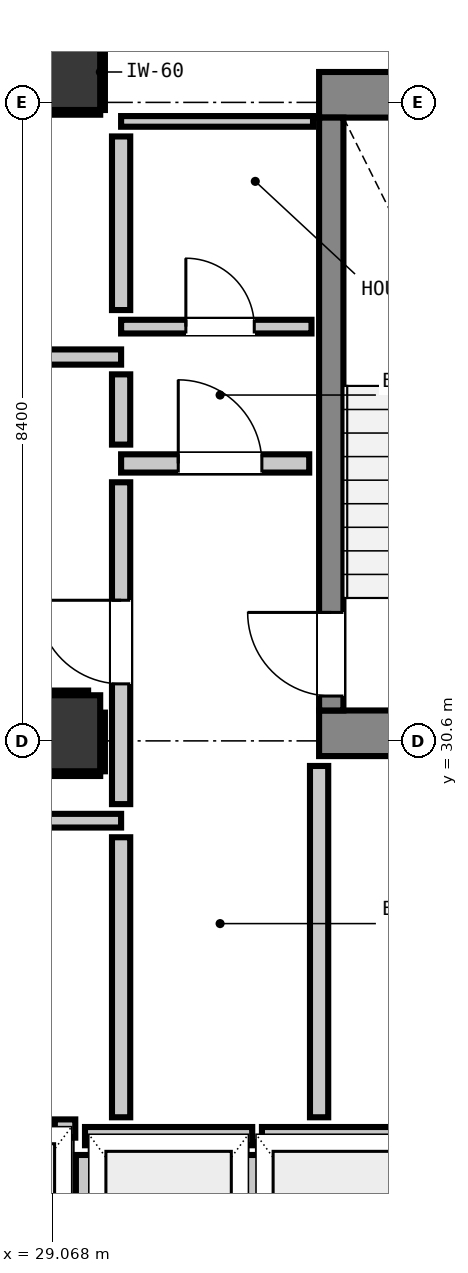
"""IFC4 building model, lengths in metres.
Left out: names, types, materials, properties, quantities, classifications, styles, units other than length and angle.
Written with IfcOpenShell. Run it as: python <this file> out.ifc"""

import sys

from ifc_helpers import new_model, si_unit, direction, frame, frame_2d, origin, origin_2d, place, context, subcontext, project, spatial, rectangle, extrude, element, fill, save


model = new_model("IFC4")
c1 = context("Model", 3, precision=1e-05, world=origin(), true_north=direction((0.0, 1.0)))
c2 = subcontext(c1, "Body", "Model", "MODEL_VIEW")
j1 = project(units=[si_unit("LENGTHUNIT", "METRE"), si_unit("PLANEANGLEUNIT", "RADIAN")], contexts=[c1])
p1 = place(None, origin())
s1 = spatial("IfcSite", under=j1, at=p1, CompositionType="ELEMENT")
p2 = place(p1, origin())
s2 = spatial("IfcBuilding", under=s1, at=p2, CompositionType="ELEMENT")
p3 = place(p2, frame((0.0, 0.0, 61.84)))
s3 = spatial("IfcBuildingStorey", under=s2, at=p3, CompositionType="ELEMENT", Elevation=61.84)
p4 = place(p3, frame((29.2, 39.4, 0.0), z_axis=(0.0, 0.0, 1.0), x_axis=(1.0, 0.0, 0.0)))
e1 = element("IfcColumn", 1, at=p4, inside=s3, PredefinedType="COLUMN", context=c2, shape_type="SweptSolid", body=[
    extrude(rectangle(XDim=1.0, YDim=1.0, at=origin_2d()), origin(), (0.0, 0.0, 1.0), 3.32),
])
p5 = place(p3, frame((32.58, 39.1, 0.0), z_axis=(0.0, 0.0, 1.0), x_axis=(1.0, 0.0, 0.0)))
e2 = element("IfcWall", 2, at=p5, inside=s3, PredefinedType="SHEAR", context=c2, shape_type="SweptSolid", body=[
    extrude(rectangle(XDim=4.08, YDim=0.6, at=frame_2d((2.04, 0.0))), origin(), (0.0, 0.0, 1.0), 3.32),
])
p6 = place(p3, frame((32.58, 30.7, 0.0), z_axis=(0.0, 0.0, 1.0), x_axis=(1.0, 0.0, 0.0)))
e3 = element("IfcWall", 3, at=p6, inside=s3, PredefinedType="SHEAR", context=c2, shape_type="SweptSolid", body=[
    extrude(rectangle(XDim=3.415, YDim=0.6, at=frame_2d((1.708, 0.0))), origin(), (0.0, 0.0, 1.0), 3.32),
])
p7 = place(p3, frame((32.74, 31.0, 0.0), z_axis=(0.0, 0.0, 1.0), x_axis=(0.0, 1.0, 0.0)))
e4 = element("IfcWall", 4, at=p7, inside=s3, PredefinedType="SHEAR", context=c2, shape_type="SweptSolid", body=[
    extrude(rectangle(XDim=7.8, YDim=0.32, at=frame_2d((3.9, 0.0))), origin(), (0.0, 0.0, 1.0), 3.32),
])
p8 = place(p7, frame((0.19, 0.0, 0.0)))
e5 = element("IfcOpeningElement", 5, at=p8, cuts=e4, PredefinedType="OPENING", context=c2, shape_type="SweptSolid", body=[
    extrude(rectangle(XDim=1.1, YDim=2.15, at=frame_2d((0.55, 1.075))), frame((0.0, 0.17, 0.0), z_axis=(0.0, -1.0, 0.0), x_axis=(1.0, 0.0, 0.0)), (0.0, 0.0, 1.0), 0.34),
])
p9 = place(p3, frame((29.2, 30.7, 0.0), z_axis=(0.0, 0.0, 1.0), x_axis=(1.0, 0.0, 0.0)))
e6 = element("IfcColumn", 6, at=p9, inside=s3, PredefinedType="COLUMN", context=c2, shape_type="SweptSolid", body=[
    extrude(rectangle(XDim=1.0, YDim=1.0, at=origin_2d()), origin(), (0.0, 0.0, 1.0), 3.32),
])
p10 = place(p3, frame((29.5, 25.4, 0.0), z_axis=(0.0, 0.0, 1.0), x_axis=(1.0, 0.0, 0.0)))
e7 = element("IfcWall", 7, at=p10, inside=s3, PredefinedType="PARTITIONING", context=c2, shape_type="SweptSolid", body=[
    extrude(rectangle(XDim=2.2, YDim=0.24, at=frame_2d((1.1, 0.0))), origin(), (0.0, 0.0, 1.0), 3.06),
])
p11 = place(p3, frame((29.5, 22.632, 0.0), z_axis=(0.0, 0.0, 1.0), x_axis=(0.0, 1.0, 0.0)))
e8 = element("IfcWall", 8, at=p11, inside=s3, PredefinedType="PARTITIONING", context=c2, shape_type="SweptSolid", body=[
    extrude(rectangle(XDim=2.52, YDim=0.24, at=frame_2d((1.26, 0.0))), origin(), (0.0, 0.0, 1.0), 2.295),
])
p12 = place(p3, frame((31.7, 22.73, 0.0), z_axis=(0.0, 0.0, 1.0), x_axis=(0.0, 1.0, 0.0)))
e9 = element("IfcWall", 9, at=p12, inside=s3, PredefinedType="PARTITIONING", context=c2, shape_type="SweptSolid", body=[
    extrude(rectangle(XDim=2.422, YDim=0.24, at=frame_2d((1.211, 0.0))), origin(), (0.0, 0.0, 1.0), 3.06),
])
p13 = place(p3, frame((31.828, 25.4, 0.0), z_axis=(0.0, 0.0, 1.0), x_axis=(1.0, 0.0, 0.0)))
e10 = element("IfcWall", 10, at=p13, inside=s3, PredefinedType="PARTITIONING", context=c2, shape_type="SweptSolid", body=[
    extrude(rectangle(XDim=2.072, YDim=0.24, at=frame_2d((1.036, 0.0))), origin(), (0.0, 0.0, 1.0), 3.06),
])
p14 = place(p3, frame((29.103, 25.5, 0.0), z_axis=(0.0, 0.0, 1.0), x_axis=(1.0, 0.0, 0.0)))
e11 = element("IfcWall", 11, at=p14, inside=s3, PredefinedType="PARTITIONING", context=c2, shape_type="SweptSolid", body=[
    extrude(rectangle(XDim=0.269, YDim=0.24, at=frame_2d((0.135, 0.0))), origin(), (0.0, 0.0, 1.0), 3.06),
])
p15 = place(p3, frame((29.975, 34.25, 0.0), z_axis=(0.0, 0.0, 1.0), x_axis=(1.0, 0.0, 0.0)))
e12 = element("IfcWall", 12, at=p15, inside=s3, PredefinedType="PARTITIONING", context=c2, shape_type="SweptSolid", body=[
    extrude(rectangle(XDim=2.475, YDim=0.24, at=frame_2d((1.237, 0.0))), origin(), (0.0, 0.0, 1.0), 3.06),
])
p16 = place(p15, frame((0.752, 0.0, 0.0)))
e13 = element("IfcOpeningElement", 13, at=p16, cuts=e12, PredefinedType="OPENING", context=c2, shape_type="SweptSolid", body=[
    extrude(rectangle(XDim=1.1, YDim=2.15, at=frame_2d((0.55, 1.075))), frame((0.0, 0.13, 0.0), z_axis=(0.0, -1.0, 0.0), x_axis=(1.0, 0.0, 0.0)), (0.0, 0.0, 1.0), 0.26),
])
p17 = place(p3, frame((28.604, 35.65, 0.0), z_axis=(0.0, 0.0, 1.0), x_axis=(1.0, 0.0, 0.0)))
e14 = element("IfcWall", 14, at=p17, inside=s3, PredefinedType="PARTITIONING", context=c2, shape_type="SweptSolid", body=[
    extrude(rectangle(XDim=1.371, YDim=0.2, at=frame_2d((0.686, 0.0))), origin(), (0.0, 0.0, 1.0), 3.06),
])
p18 = place(p3, frame((20.65, 29.55, 0.0), z_axis=(0.0, 0.0, 1.0), x_axis=(1.0, 0.0, 0.0)))
e15 = element("IfcWall", 15, at=p18, inside=s3, PredefinedType="PARTITIONING", context=c2, shape_type="SweptSolid", body=[
    extrude(rectangle(XDim=9.325, YDim=0.18, at=frame_2d((4.663, 0.0))), origin(), (0.0, 0.0, 1.0), 3.06),
])
p19 = place(p3, frame((29.975, 36.05, 0.0), z_axis=(0.0, 0.0, 1.0), x_axis=(1.0, 0.0, 0.0)))
e16 = element("IfcWall", 16, at=p19, inside=s3, PredefinedType="PARTITIONING", context=c2, shape_type="SweptSolid", body=[
    extrude(rectangle(XDim=2.505, YDim=0.18, at=frame_2d((1.252, 0.0))), origin(), (0.0, 0.0, 1.0), 3.06),
])
p20 = place(p19, frame((0.852, 0.0, 0.0)))
e17 = element("IfcOpeningElement", 17, at=p20, cuts=e16, PredefinedType="OPENING", context=c2, shape_type="SweptSolid", body=[
    extrude(rectangle(XDim=0.9, YDim=2.1, at=frame_2d((0.45, 1.05))), frame((0.0, 0.1, 0.0), z_axis=(0.0, -1.0, 0.0), x_axis=(1.0, 0.0, 0.0)), (0.0, 0.0, 1.0), 0.2),
])
p21 = place(p3, frame((29.975, 38.75, 0.0), z_axis=(0.0, 0.0, 1.0), x_axis=(1.0, 0.0, 0.0)))
e18 = element("IfcWall", 18, at=p21, inside=s3, PredefinedType="PARTITIONING", context=c2, shape_type="SweptSolid", body=[
    extrude(rectangle(XDim=2.525, YDim=0.14, at=frame_2d((1.262, 0.0))), origin(), (0.0, 0.0, 1.0), 3.06),
])
p22 = place(p3, frame((29.975, 25.648, 0.0), z_axis=(0.0, 0.0, 1.0), x_axis=(0.0, 1.0, 0.0)))
e19 = element("IfcWall", 19, at=p22, inside=s3, PredefinedType="PARTITIONING", context=c2, shape_type="SweptSolid", body=[
    extrude(rectangle(XDim=3.684, YDim=0.24, at=frame_2d((1.842, 0.0))), origin(), (0.0, 0.0, 1.0), 3.06),
])
p23 = place(p3, frame((29.975, 29.768, 0.0), z_axis=(0.0, 0.0, 1.0), x_axis=(0.0, 1.0, 0.0)))
e20 = element("IfcWall", 20, at=p23, inside=s3, PredefinedType="PARTITIONING", context=c2, shape_type="SweptSolid", body=[
    extrude(rectangle(XDim=4.234, YDim=0.24, at=frame_2d((2.117, 0.0))), origin(), (0.0, 0.0, 1.0), 3.06),
])
p24 = place(p23, frame((1.582, 0.0, 0.0)))
e21 = element("IfcOpeningElement", 21, at=p24, cuts=e20, PredefinedType="OPENING", context=c2, shape_type="SweptSolid", body=[
    extrude(rectangle(XDim=1.1, YDim=2.15, at=frame_2d((0.55, 1.075))), frame((0.0, 0.13, 0.0), z_axis=(0.0, -1.0, 0.0), x_axis=(1.0, 0.0, 0.0)), (0.0, 0.0, 1.0), 0.26),
])
p25 = place(p3, frame((29.975, 34.498, 0.0), z_axis=(0.0, 0.0, 1.0), x_axis=(0.0, 1.0, 0.0)))
e22 = element("IfcWall", 22, at=p25, inside=s3, PredefinedType="PARTITIONING", context=c2, shape_type="SweptSolid", body=[
    extrude(rectangle(XDim=0.924, YDim=0.24, at=frame_2d((0.462, 0.0))), origin(), (0.0, 0.0, 1.0), 3.06),
])
p26 = place(p3, frame((29.975, 36.268, 0.0), z_axis=(0.0, 0.0, 1.0), x_axis=(0.0, 1.0, 0.0)))
e23 = element("IfcWall", 23, at=p26, inside=s3, PredefinedType="PARTITIONING", context=c2, shape_type="SweptSolid", body=[
    extrude(rectangle(XDim=2.284, YDim=0.24, at=frame_2d((1.142, 0.0))), origin(), (0.0, 0.0, 1.0), 3.06),
])
p27 = place(p3, frame((32.58, 25.648, 0.0), z_axis=(0.0, 0.0, 1.0), x_axis=(0.0, 1.0, 0.0)))
e24 = element("IfcWall", 24, at=p27, inside=s3, PredefinedType="PARTITIONING", context=c2, shape_type="SweptSolid", body=[
    extrude(rectangle(XDim=4.622, YDim=0.24, at=frame_2d((2.311, 0.0))), origin(), (0.0, 0.0, 1.0), 3.06),
])
p28 = place(p3, frame((28.71, 38.868, 0.0), z_axis=(0.0, 0.0, 1.0), x_axis=(1.0, 0.0, 0.0)))
e25 = element("IfcWall", 25, at=p28, inside=s3, PredefinedType="PARTITIONING", context=c2, shape_type="SweptSolid", body=[
    extrude(rectangle(XDim=0.99, YDim=0.06, at=frame_2d((0.495, 0.0))), origin(), (0.0, 0.0, 1.0), 1.45),
])
for number, where, z_axis, x_axis in (
    (26, (29.732, 38.9, 0.0), (0.0, 0.0, 1.0), (0.0, 1.0, 0.0)),
    (27, (28.7, 30.168, 0.0), (0.0, 0.0, 1.0), (1.0, 0.0, 0.0)),
):
    element("IfcWall", number, at=place(p3, frame(where, z_axis=z_axis, x_axis=x_axis)), inside=s3, PredefinedType="PARTITIONING", context=c2, shape_type="SweptSolid", body=[
        extrude(rectangle(XDim=1.0, YDim=0.06, at=frame_2d((0.5, 0.0))), origin(), (0.0, 0.0, 1.0), 1.45),
    ])
p29 = place(p3, frame((28.7, 31.232, 0.0), z_axis=(0.0, 0.0, 1.0), x_axis=(1.0, 0.0, 0.0)))
e28 = element("IfcWall", 28, at=p29, inside=s3, PredefinedType="PARTITIONING", context=c2, shape_type="SweptSolid", body=[
    extrude(rectangle(XDim=0.841, YDim=0.06, at=frame_2d((0.42, 0.0))), origin(), (0.0, 0.0, 1.0), 1.45),
])
p30 = place(p3, frame((29.732, 30.2, 0.0), z_axis=(0.0, 0.0, 1.0), x_axis=(0.0, 1.0, 0.0)))
e29 = element("IfcWall", 29, at=p30, inside=s3, PredefinedType="PARTITIONING", context=c2, shape_type="SweptSolid", body=[
    extrude(rectangle(XDim=0.772, YDim=0.06, at=frame_2d((0.386, 0.0))), origin(), (0.0, 0.0, 1.0), 1.45),
])
p31 = place(p8, origin())
e30 = element("IfcDoor", 30, at=p31, inside=s3, OperationType="SINGLE_SWING_RIGHT", PredefinedType="DOOR", context=c2, shape_type="SweptSolid", body=[
    extrude(rectangle(XDim=1.1, YDim=2.15, at=frame_2d((0.55, 1.075))), frame((0.0, 0.025, 0.0), z_axis=(0.0, -1.0, 0.0), x_axis=(1.0, 0.0, 0.0)), (0.0, 0.0, 1.0), 0.05),
])
fill(e5, e30)
p32 = place(p24, origin())
e31 = element("IfcDoor", 31, at=p32, inside=s3, OperationType="SINGLE_SWING_RIGHT", PredefinedType="DOOR", context=c2, shape_type="SweptSolid", body=[
    extrude(rectangle(XDim=1.1, YDim=2.15, at=frame_2d((0.55, 1.075))), frame((0.0, 0.025, 0.0), z_axis=(0.0, -1.0, 0.0), x_axis=(1.0, 0.0, 0.0)), (0.0, 0.0, 1.0), 0.05),
])
fill(e21, e31)
p33 = place(p16, origin())
e32 = element("IfcDoor", 32, at=p33, inside=s3, OperationType="SINGLE_SWING_LEFT", PredefinedType="DOOR", context=c2, shape_type="SweptSolid", body=[
    extrude(rectangle(XDim=1.1, YDim=2.15, at=frame_2d((0.55, 1.075))), frame((0.0, 0.025, 0.0), z_axis=(0.0, -1.0, 0.0), x_axis=(1.0, 0.0, 0.0)), (0.0, 0.0, 1.0), 0.05),
])
fill(e13, e32)
p34 = place(p20, origin())
e33 = element("IfcDoor", 33, at=p34, inside=s3, OperationType="SINGLE_SWING_LEFT", PredefinedType="DOOR", context=c2, shape_type="SweptSolid", body=[
    extrude(rectangle(XDim=0.9, YDim=2.1, at=frame_2d((0.45, 1.05))), frame((0.0, 0.025, 0.0), z_axis=(0.0, -1.0, 0.0), x_axis=(1.0, 0.0, 0.0)), (0.0, 0.0, 1.0), 0.05),
])
fill(e17, e33)
save(model, sys.argv[1])
